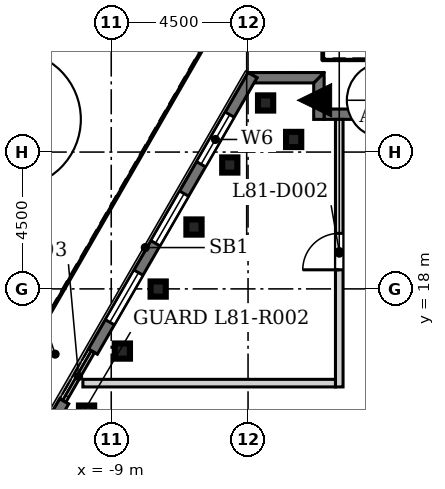
"""IFC4 building model, lengths in metres.
Left out: names, types, materials, properties, quantities, classifications, styles, units other than length and angle.
Written with IfcOpenShell. Run it as: python <this file> out.ifc"""

import sys

from ifc_helpers import new_model, si_unit, direction, frame, frame_2d, origin, origin_2d, place, context, subcontext, project, spatial, polyline, rectangle, hollow_rectangle, outline, extrude, element, fill, save


model = new_model("IFC4")
c1 = context("Model", 3, precision=1e-05, world=origin(), true_north=direction((0.0, 1.0)))
c2 = subcontext(c1, "Body", "Model", "MODEL_VIEW")
j1 = project(units=[si_unit("LENGTHUNIT", "METRE"), si_unit("PLANEANGLEUNIT", "RADIAN")], contexts=[c1])
p1 = place(None, origin())
s1 = spatial("IfcSite", under=j1, at=p1, CompositionType="ELEMENT")
p2 = place(p1, origin())
s2 = spatial("IfcBuilding", under=s1, at=p2, CompositionType="ELEMENT")
p3 = place(p2, frame((0.0, 0.0, 359.6)))
s3 = spatial("IfcBuildingStorey", under=s2, at=p3, CompositionType="ELEMENT", Elevation=359.6)
for number, where, z_axis, x_axis in (
    (1, (-3.0, 22.915, 0.0), (0.0, 0.0, 1.0), (1.0, 0.0, 0.0)),
    (2, (-3.923, 24.115, 0.0), (0.0, 0.0, 1.0), (1.0, 0.0, 0.0)),
    (3, (-5.101, 22.075, 0.0), (0.0, 0.0, 1.0), (1.0, 0.0, 0.0)),
    (4, (-6.278, 20.035, 0.0), (0.0, 0.0, 1.0), (1.0, 0.0, 0.0)),
    (5, (-7.456, 17.994, 0.0), (0.0, 0.0, 1.0), (1.0, 0.0, 0.0)),
    (6, (-8.634, 15.955, 0.0), (0.0, 0.0, 1.0), (1.0, 0.0, 0.0)),
    (7, (-9.812, 13.914, 0.0), (0.0, 0.0, 1.0), (1.0, 0.0, 0.0)),
):
    element("IfcColumn", number, at=place(p3, frame(where, z_axis=z_axis, x_axis=x_axis)), inside=s3, PredefinedType="COLUMN", context=c2, shape_type="SweptSolid", body=[
        extrude(hollow_rectangle(XDim=0.5, YDim=0.5, WallThickness=0.025, at=origin_2d()), origin(), (0.0, 0.0, 1.0), 3.6),
    ])
p4 = place(p3, frame((2.0, 23.745, 0.0), z_axis=(0.0, 0.0, 1.0), x_axis=(-1.0, 0.0, 0.0)))
e8 = element("IfcWall", 8, at=p4, inside=s3, PredefinedType="SOLIDWALL", context=c2, shape_type="SweptSolid", body=[
    extrude(rectangle(XDim=4.0, YDim=0.34, at=frame_2d((2.0, 0.0))), origin(), (0.0, 0.0, 1.0), 3.6),
])
p5 = place(p4, frame((0.2, 0.0, 0.0)))
e9 = element("IfcOpeningElement", 9, at=p5, cuts=e8, PredefinedType="OPENING", context=c2, shape_type="SweptSolid", body=[
    extrude(rectangle(XDim=1.5, YDim=2.4, at=frame_2d((0.75, 1.2))), frame((0.0, 0.18, 0.0), z_axis=(0.0, -1.0, 0.0), x_axis=(1.0, 0.0, 0.0)), (0.0, 0.0, 1.0), 0.36),
])
p6 = place(p3, origin())
e10 = element("IfcWall", 10, at=p6, inside=s3, PredefinedType="SOLIDWALL", context=c2, shape_type="SweptSolid", body=[
    extrude(outline(polyline([(-2.0, 25.116), (-2.0, 23.574), (-2.341, 23.574), (-2.341, 24.775), (-2.0, 25.116), (-2.0, 25.116)])), origin(), (0.0, 0.0, 1.0), 3.6),
])
p7 = place(p3, origin())
e11 = element("IfcWall", 11, at=p7, inside=s3, PredefinedType="SOLIDWALL", context=c2, shape_type="SweptSolid", body=[
    extrude(outline(polyline([(-4.305, 24.774), (-4.206, 24.945), (-4.501, 25.115), (-4.501, 25.115), (-1.999, 25.115), (-1.999, 25.115), (-2.34, 24.774), (-4.305, 24.774)])), origin(), (0.0, 0.0, 1.0), 3.6),
])
p8 = place(p3, frame((-4.353, 25.03, 0.0), z_axis=(0.0, 0.0, 1.0), x_axis=(-0.500000207062, -0.866025284237, 0.0)))
e12 = element("IfcWall", 12, at=p8, inside=s3, PredefinedType="SOLIDWALL", context=c2, shape_type="SweptSolid", body=[
    extrude(rectangle(XDim=10.5, YDim=0.34, at=frame_2d((5.25, 0.0))), origin(), (0.0, 0.0, 1.0), 3.6),
])
p9 = place(p8, frame((1.5, 0.0, 0.9)))
e13 = element("IfcOpeningElement", 13, at=p9, cuts=e12, PredefinedType="OPENING", context=c2, shape_type="SweptSolid", body=[
    extrude(rectangle(XDim=1.885, YDim=3.0, at=frame_2d((0.942, 1.5))), frame((0.0, 0.18, 0.0), z_axis=(0.0, -1.0, 0.0), x_axis=(1.0, 0.0, 0.0)), (0.0, 0.0, 1.0), 0.36),
])
p10 = place(p8, frame((4.5, 0.0, 0.9)))
e14 = element("IfcOpeningElement", 14, at=p10, cuts=e12, PredefinedType="OPENING", context=c2, shape_type="SweptSolid", body=[
    extrude(rectangle(XDim=1.885, YDim=3.0, at=frame_2d((0.942, 1.5))), frame((0.0, 0.18, 0.0), z_axis=(0.0, -1.0, 0.0), x_axis=(1.0, 0.0, 0.0)), (0.0, 0.0, 1.0), 0.36),
])
p11 = place(p8, frame((7.5, 0.0, 0.9)))
e15 = element("IfcOpeningElement", 15, at=p11, cuts=e12, PredefinedType="OPENING", context=c2, shape_type="SweptSolid", body=[
    extrude(rectangle(XDim=1.885, YDim=3.0, at=frame_2d((0.942, 1.5))), frame((0.0, 0.18, 0.0), z_axis=(0.0, -1.0, 0.0), x_axis=(1.0, 0.0, 0.0)), (0.0, 0.0, 1.0), 0.36),
])
p12 = place(p3, frame((-10.545, 14.304, 0.0), z_axis=(0.0, 0.0, 1.0), x_axis=(-0.500018604663, -0.866014662111, 0.0)))
e16 = element("IfcWall", 16, at=p12, inside=s3, PredefinedType="SOLIDWALL", context=c2, shape_type="SweptSolid", body=[
    extrude(rectangle(XDim=4.115, YDim=0.34, at=frame_2d((2.058, 0.0))), origin(), (0.0, 0.0, 1.0), 3.6),
])
p13 = place(p12, frame((1.115, 0.0, 0.0)))
e17 = element("IfcOpeningElement", 17, at=p13, cuts=e16, PredefinedType="OPENING", context=c2, shape_type="SweptSolid", body=[
    extrude(rectangle(XDim=1.885, YDim=2.6, at=frame_2d((0.942, 1.3))), frame((0.0, 0.18, 0.0), z_axis=(0.0, -1.0, 0.0), x_axis=(1.0, 0.0, 0.0)), (0.0, 0.0, 1.0), 0.36),
])
p14 = place(p3, frame((-1.5, 14.775, 0.0), z_axis=(0.0, 0.0, 1.0), x_axis=(0.0, 1.0, 0.0)))
e18 = element("IfcWall", 18, at=p14, inside=s3, PredefinedType="SOLIDWALL", context=c2, shape_type="SweptSolid", body=[
    extrude(rectangle(XDim=8.8, YDim=0.25, at=frame_2d((4.4, 0.0))), origin(), (0.0, 0.0, 1.0), 3.6),
])
p15 = place(p14, frame((3.852, 0.0, 0.0)))
e19 = element("IfcOpeningElement", 19, at=p15, cuts=e18, PredefinedType="OPENING", context=c2, shape_type="SweptSolid", body=[
    extrude(rectangle(XDim=1.2, YDim=2.1, at=frame_2d((0.6, 1.05))), frame((0.0, 0.135, 0.0), z_axis=(0.0, -1.0, 0.0), x_axis=(1.0, 0.0, 0.0)), (0.0, 0.0, 1.0), 0.27),
])
p16 = place(p3, frame((-9.933, 14.9, 0.0), z_axis=(0.0, 0.0, 1.0), x_axis=(1.0, 0.0, 0.0)))
e20 = element("IfcWall", 20, at=p16, inside=s3, PredefinedType="SOLIDWALL", context=c2, shape_type="SweptSolid", body=[
    extrude(rectangle(XDim=8.308, YDim=0.25, at=frame_2d((4.154, 0.0))), origin(), (0.0, 0.0, 1.0), 3.6),
])
p17 = place(p9, origin())
e21 = element("IfcWindow", 21, at=p17, inside=s3, PartitioningType="SINGLE_PANEL", PredefinedType="WINDOW", context=c2, shape_type="SweptSolid", body=[
    extrude(rectangle(XDim=1.885, YDim=3.0, at=frame_2d((0.942, 1.5))), frame((0.0, 0.11, 0.0), z_axis=(0.0, -1.0, 0.0), x_axis=(1.0, 0.0, 0.0)), (0.0, 0.0, 1.0), 0.06),
])
fill(e13, e21)
p18 = place(p10, origin())
e22 = element("IfcWindow", 22, at=p18, inside=s3, PartitioningType="SINGLE_PANEL", PredefinedType="WINDOW", context=c2, shape_type="SweptSolid", body=[
    extrude(rectangle(XDim=1.885, YDim=3.0, at=frame_2d((0.942, 1.5))), frame((0.0, 0.11, 0.0), z_axis=(0.0, -1.0, 0.0), x_axis=(1.0, 0.0, 0.0)), (0.0, 0.0, 1.0), 0.06),
])
fill(e14, e22)
p19 = place(p11, origin())
e23 = element("IfcWindow", 23, at=p19, inside=s3, PartitioningType="SINGLE_PANEL", PredefinedType="WINDOW", context=c2, shape_type="SweptSolid", body=[
    extrude(rectangle(XDim=1.885, YDim=3.0, at=frame_2d((0.942, 1.5))), frame((0.0, 0.11, 0.0), z_axis=(0.0, -1.0, 0.0), x_axis=(1.0, 0.0, 0.0)), (0.0, 0.0, 1.0), 0.06),
])
fill(e15, e23)
p20 = place(p15, origin())
e24 = element("IfcDoor", 24, at=p20, inside=s3, OperationType="SINGLE_SWING_LEFT", PredefinedType="DOOR", context=c2, shape_type="SweptSolid", body=[
    extrude(rectangle(XDim=1.2, YDim=2.1, at=frame_2d((0.6, 1.05))), frame((0.0, 0.025, 0.0), z_axis=(0.0, -1.0, 0.0), x_axis=(1.0, 0.0, 0.0)), (0.0, 0.0, 1.0), 0.05),
])
fill(e19, e24)
save(model, sys.argv[1])
